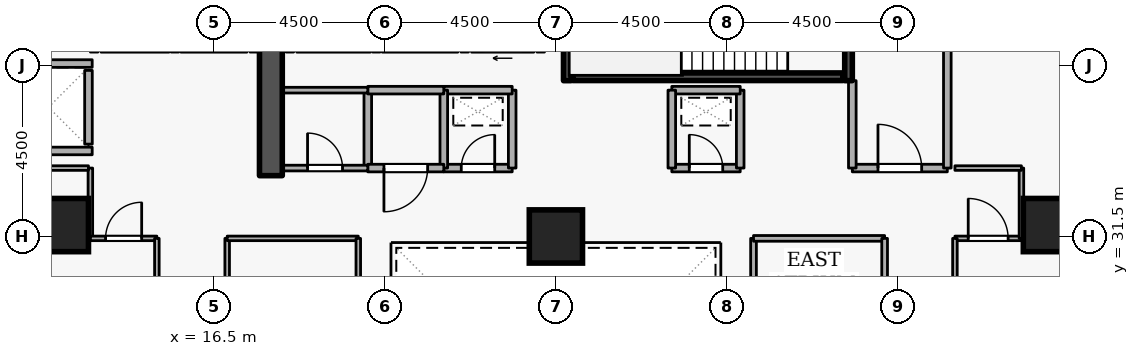
"""IFC4 building model, lengths in metres.
Left out: names, types, materials, properties, quantities, classifications, styles, units other than length and angle.
Written with IfcOpenShell. Run it as: python <this file> out.ifc"""

import sys

from ifc_helpers import new_model, si_unit, direction, frame, frame_2d, origin, origin_2d, place, context, subcontext, project, spatial, rectangle, extrude, element, fill, save


model = new_model("IFC4")
c1 = context("Model", 3, precision=1e-05, world=origin(), true_north=direction((0.0, 1.0)))
c2 = subcontext(c1, "Body", "Model", "MODEL_VIEW")
j1 = project(units=[si_unit("LENGTHUNIT", "METRE"), si_unit("PLANEANGLEUNIT", "RADIAN")], contexts=[c1])
p1 = place(None, origin())
s1 = spatial("IfcSite", under=j1, at=p1, CompositionType="ELEMENT")
p2 = place(p1, origin())
s2 = spatial("IfcBuilding", under=s1, at=p2, CompositionType="ELEMENT")
p3 = place(p2, frame((0.0, 0.0, 68.1)))
s3 = spatial("IfcBuildingStorey", under=s2, at=p3, CompositionType="ELEMENT", Elevation=68.1)
p4 = place(p3, frame((18.0, 33.1, 0.0), z_axis=(0.0, 0.0, 1.0), x_axis=(0.0, 1.0, 0.0)))
e1 = element("IfcWall", 1, at=p4, inside=s3, PredefinedType="SHEAR", context=c2, shape_type="SweptSolid", body=[
    extrude(rectangle(XDim=5.7, YDim=0.6, at=frame_2d((2.85, 0.0))), origin(), (0.0, 0.0, 1.0), 3.6),
])
for number, where, z_axis, x_axis in (
    (2, (12.5, 31.8, 0.0), (0.0, 0.0, 1.0), (1.0, 0.0, 0.0)),
    (3, (38.5, 31.8, 0.0), (0.0, 0.0, 1.0), (1.0, 0.0, 0.0)),
    (4, (25.5, 31.5, 0.0), (0.0, 0.0, 1.0), (1.0, 0.0, 0.0)),
):
    element("IfcColumn", number, at=place(p3, frame(where, z_axis=z_axis, x_axis=x_axis)), inside=s3, PredefinedType="COLUMN", context=c2, shape_type="SweptSolid", body=[
        extrude(rectangle(XDim=1.4, YDim=1.4, at=origin_2d()), origin(), (0.0, 0.0, 1.0), 3.6),
    ])
p5 = place(p3, frame((24.92, 36.45, 0.0), z_axis=(0.0, 0.0, 1.0), x_axis=(-1.0, 0.0, 0.0)))
e5 = element("IfcWall", 5, at=p5, inside=s3, PredefinedType="STANDARD", context=c2, shape_type="SweptSolid", body=[
    extrude(rectangle(XDim=1.64, YDim=0.2, at=frame_2d((0.82, 0.0))), origin(), (0.0, 0.0, 1.0), 3.26),
])
p6 = place(p5, frame((0.31, 0.0, 0.0)))
e6 = element("IfcOpeningElement", 6, at=p6, cuts=e5, PredefinedType="OPENING", context=c2, shape_type="SweptSolid", body=[
    extrude(rectangle(XDim=1.02, YDim=2.06, at=frame_2d((0.51, 1.03))), frame((0.0, 0.11, 0.0), z_axis=(0.0, -1.0, 0.0), x_axis=(1.0, 0.0, 0.0)), (0.0, 0.0, 1.0), 0.22),
])
p7 = place(p3, frame((22.92, 36.45, 0.0), z_axis=(0.0, 0.0, 1.0), x_axis=(-1.0, 0.0, 0.0)))
e7 = element("IfcWall", 7, at=p7, inside=s3, PredefinedType="STANDARD", context=c2, shape_type="SweptSolid", body=[
    extrude(rectangle(XDim=1.99, YDim=0.2, at=frame_2d((0.995, 0.0))), origin(), (0.0, 0.0, 1.0), 3.26),
])
p8 = place(p3, frame((20.62, 36.45, 0.0), z_axis=(0.0, 0.0, 1.0), x_axis=(-1.0, 0.0, 0.0)))
e8 = element("IfcWall", 8, at=p8, inside=s3, PredefinedType="STANDARD", context=c2, shape_type="SweptSolid", body=[
    extrude(rectangle(XDim=1.94, YDim=0.2, at=frame_2d((0.97, 0.0))), origin(), (0.0, 0.0, 1.0), 3.26),
])
p9 = place(p3, frame((17.37, 36.45, 0.0), z_axis=(0.0, 0.0, 1.0), x_axis=(-1.0, 0.0, 0.0)))
e9 = element("IfcWall", 9, at=p9, inside=s3, PredefinedType="STANDARD", context=c2, shape_type="SweptSolid", body=[
    extrude(rectangle(XDim=1.74, YDim=0.2, at=frame_2d((0.87, 0.0))), origin(), (0.0, 0.0, 1.0), 3.26),
])
p10 = place(p3, frame((15.32, 36.45, 0.0), z_axis=(0.0, 0.0, 1.0), x_axis=(-1.0, 0.0, 0.0)))
e10 = element("IfcWall", 10, at=p10, inside=s3, PredefinedType="STANDARD", context=c2, shape_type="SweptSolid", body=[
    extrude(rectangle(XDim=1.79, YDim=0.2, at=frame_2d((0.895, 0.0))), origin(), (0.0, 0.0, 1.0), 3.26),
])
p11 = place(p3, frame((13.2, 33.93, 0.0), z_axis=(0.0, 0.0, 1.0), x_axis=(0.0, 1.0, 0.0)))
e11 = element("IfcWall", 11, at=p11, inside=s3, PredefinedType="STANDARD", context=c2, shape_type="SweptSolid", body=[
    extrude(rectangle(XDim=1.94, YDim=0.2, at=frame_2d((0.97, 0.0))), origin(), (0.0, 0.0, 1.0), 3.26),
])
for number, where, z_axis, x_axis in (
    (12, (11.002, 36.05, 0.0), (0.0, 0.0, 1.0), (1.0, 0.0, 0.0)),
    (13, (11.002, 33.75, 0.0), (0.0, 0.0, 1.0), (1.0, 0.0, 0.0)),
):
    element("IfcWall", number, at=place(p3, frame(where, z_axis=z_axis, x_axis=x_axis)), inside=s3, PredefinedType="STANDARD", context=c2, shape_type="SweptSolid", body=[
        extrude(rectangle(XDim=2.296, YDim=0.2, at=frame_2d((1.148, 0.0))), origin(), (0.0, 0.0, 1.0), 3.26),
    ])
p12 = place(p3, frame((33.2, 38.95, 0.0), z_axis=(0.0, 0.0, 1.0), x_axis=(0.0, -1.0, 0.0)))
e14 = element("IfcWall", 14, at=p12, inside=s3, PredefinedType="SHEAR", context=c2, shape_type="SweptSolid", body=[
    extrude(rectangle(XDim=3.35, YDim=0.2, at=frame_2d((1.675, 0.0))), origin(), (0.0, 0.0, 1.0), 3.6),
])
p13 = place(p12, frame((1.125, 0.0, 0.0)))
e15 = element("IfcOpeningElement", 15, at=p13, cuts=e14, PredefinedType="OPENING", context=c2, shape_type="SweptSolid", body=[
    extrude(rectangle(XDim=1.1, YDim=2.1, at=frame_2d((0.55, 1.05))), frame((0.0, 0.11, 0.0), z_axis=(0.0, -1.0, 0.0), x_axis=(1.0, 0.0, 0.0)), (0.0, 0.0, 1.0), 0.22),
])
p14 = place(p3, frame((25.8, 35.6, 0.0), z_axis=(0.0, 0.0, 1.0), x_axis=(0.0, 1.0, 0.0)))
e16 = element("IfcWall", 16, at=p14, inside=s3, PredefinedType="SHEAR", context=c2, shape_type="SweptSolid", body=[
    extrude(rectangle(XDim=3.35, YDim=0.2, at=frame_2d((1.675, 0.0))), origin(), (0.0, 0.0, 1.0), 3.6),
])
p15 = place(p3, frame((25.95, 35.703, 0.0), z_axis=(0.0, 0.0, 1.0), x_axis=(1.0, 0.0, 0.0)))
e17 = element("IfcWall", 17, at=p15, inside=s3, PredefinedType="SHEAR", context=c2, shape_type="SweptSolid", body=[
    extrude(rectangle(XDim=7.1, YDim=0.2, at=frame_2d((3.55, 0.0))), origin(), (0.0, 0.0, 1.0), 3.6),
])
p16 = place(p3, frame((33.3, 33.3, 0.0), z_axis=(0.0, 0.0, 1.0), x_axis=(1.0, 0.0, 0.0)))
e18 = element("IfcWall", 18, at=p16, inside=s3, PredefinedType="STANDARD", context=c2, shape_type="SweptSolid", body=[
    extrude(rectangle(XDim=2.5, YDim=0.2, at=frame_2d((1.25, 0.0))), origin(), (0.0, 0.0, 1.0), 3.26),
])
p17 = place(p16, frame((0.675, 0.0, 0.0)))
e19 = element("IfcOpeningElement", 19, at=p17, cuts=e18, PredefinedType="OPENING", context=c2, shape_type="SweptSolid", body=[
    extrude(rectangle(XDim=1.15, YDim=2.1, at=frame_2d((0.575, 1.05))), frame((0.0, 0.11, 0.0), z_axis=(0.0, -1.0, 0.0), x_axis=(1.0, 0.0, 0.0)), (0.0, 0.0, 1.0), 0.22),
])
p18 = place(p3, frame((35.8, 33.3, 0.0), z_axis=(0.0, 0.0, 1.0), x_axis=(0.0, 1.0, 0.0)))
e20 = element("IfcWall", 20, at=p18, inside=s3, PredefinedType="STANDARD", context=c2, shape_type="SweptSolid", body=[
    extrude(rectangle(XDim=5.7, YDim=0.2, at=frame_2d((2.85, 0.0))), origin(), (0.0, 0.0, 1.0), 3.26),
])
p19 = place(p3, frame((33.3, 35.6, 0.0), z_axis=(0.0, 0.0, 1.0), x_axis=(0.0, -1.0, 0.0)))
e21 = element("IfcWall", 21, at=p19, inside=s3, PredefinedType="STANDARD", context=c2, shape_type="SweptSolid", body=[
    extrude(rectangle(XDim=2.3, YDim=0.2, at=frame_2d((1.15, 0.0))), origin(), (0.0, 0.0, 1.0), 2.465),
])
p20 = place(p3, frame((22.55, 33.3, 0.0), z_axis=(0.0, 0.0, 1.0), x_axis=(1.0, 0.0, 0.0)))
e22 = element("IfcWall", 22, at=p20, inside=s3, PredefinedType="STANDARD", context=c2, shape_type="SweptSolid", body=[
    extrude(rectangle(XDim=1.8, YDim=0.2, at=frame_2d((0.9, 0.0))), origin(), (0.0, 0.0, 1.0), 3.26),
])
p21 = place(p20, frame((0.46, 0.0, 0.0)))
e23 = element("IfcOpeningElement", 23, at=p21, cuts=e22, PredefinedType="OPENING", context=c2, shape_type="SweptSolid", body=[
    extrude(rectangle(XDim=0.88, YDim=2.04, at=frame_2d((0.44, 1.02))), frame((0.0, 0.11, 0.0), z_axis=(0.0, -1.0, 0.0), x_axis=(1.0, 0.0, 0.0)), (0.0, 0.0, 1.0), 0.22),
])
p22 = place(p3, frame((24.35, 33.3, 0.0), z_axis=(0.0, 0.0, 1.0), x_axis=(0.0, 1.0, 0.0)))
e24 = element("IfcWall", 24, at=p22, inside=s3, PredefinedType="STANDARD", context=c2, shape_type="SweptSolid", body=[
    extrude(rectangle(XDim=2.05, YDim=0.2, at=frame_2d((1.025, 0.0))), origin(), (0.0, 0.0, 1.0), 3.26),
])
p23 = place(p3, frame((24.35, 35.35, 0.0), z_axis=(0.0, 0.0, 1.0), x_axis=(-1.0, 0.0, 0.0)))
e25 = element("IfcWall", 25, at=p23, inside=s3, PredefinedType="STANDARD", context=c2, shape_type="SweptSolid", body=[
    extrude(rectangle(XDim=1.8, YDim=0.2, at=frame_2d((0.9, 0.0))), origin(), (0.0, 0.0, 1.0), 3.26),
])
p24 = place(p3, frame((22.55, 35.35, 0.0), z_axis=(0.0, 0.0, 1.0), x_axis=(0.0, -1.0, 0.0)))
e26 = element("IfcWall", 26, at=p24, inside=s3, PredefinedType="STANDARD", context=c2, shape_type="SweptSolid", body=[
    extrude(rectangle(XDim=2.05, YDim=0.2, at=frame_2d((1.025, 0.0))), origin(), (0.0, 0.0, 1.0), 3.26),
])
p25 = place(p3, frame((28.55, 33.3, 0.0), z_axis=(0.0, 0.0, 1.0), x_axis=(1.0, 0.0, 0.0)))
e27 = element("IfcWall", 27, at=p25, inside=s3, PredefinedType="STANDARD", context=c2, shape_type="SweptSolid", body=[
    extrude(rectangle(XDim=1.8, YDim=0.2, at=frame_2d((0.9, 0.0))), origin(), (0.0, 0.0, 1.0), 3.26),
])
p26 = place(p25, frame((0.46, 0.0, 0.0)))
e28 = element("IfcOpeningElement", 28, at=p26, cuts=e27, PredefinedType="OPENING", context=c2, shape_type="SweptSolid", body=[
    extrude(rectangle(XDim=0.88, YDim=2.04, at=frame_2d((0.44, 1.02))), frame((0.0, 0.11, 0.0), z_axis=(0.0, -1.0, 0.0), x_axis=(1.0, 0.0, 0.0)), (0.0, 0.0, 1.0), 0.22),
])
p27 = place(p3, frame((30.35, 33.3, 0.0), z_axis=(0.0, 0.0, 1.0), x_axis=(0.0, 1.0, 0.0)))
e29 = element("IfcWall", 29, at=p27, inside=s3, PredefinedType="STANDARD", context=c2, shape_type="SweptSolid", body=[
    extrude(rectangle(XDim=2.05, YDim=0.2, at=frame_2d((1.025, 0.0))), origin(), (0.0, 0.0, 1.0), 3.26),
])
p28 = place(p3, frame((30.35, 35.35, 0.0), z_axis=(0.0, 0.0, 1.0), x_axis=(-1.0, 0.0, 0.0)))
e30 = element("IfcWall", 30, at=p28, inside=s3, PredefinedType="STANDARD", context=c2, shape_type="SweptSolid", body=[
    extrude(rectangle(XDim=1.8, YDim=0.2, at=frame_2d((0.9, 0.0))), origin(), (0.0, 0.0, 1.0), 3.26),
])
for number, where, z_axis, x_axis in (
    (31, (28.55, 35.35, 0.0), (0.0, 0.0, 1.0), (0.0, -1.0, 0.0)),
    (32, (20.55, 33.3, 0.0), (0.0, 0.0, 1.0), (0.0, 1.0, 0.0)),
):
    element("IfcWall", number, at=place(p3, frame(where, z_axis=z_axis, x_axis=x_axis)), inside=s3, PredefinedType="STANDARD", context=c2, shape_type="SweptSolid", body=[
        extrude(rectangle(XDim=2.05, YDim=0.2, at=frame_2d((1.025, 0.0))), origin(), (0.0, 0.0, 1.0), 3.26),
    ])
p29 = place(p3, frame((20.55, 35.35, 0.0), z_axis=(0.0, 0.0, 1.0), x_axis=(1.0, 0.0, 0.0)))
e33 = element("IfcWall", 33, at=p29, inside=s3, PredefinedType="STANDARD", context=c2, shape_type="SweptSolid", body=[
    extrude(rectangle(XDim=2.0, YDim=0.2, at=frame_2d((1.0, 0.0))), origin(), (0.0, 0.0, 1.0), 3.26),
])
p30 = place(p3, frame((22.55, 33.3, 0.0), z_axis=(0.0, 0.0, 1.0), x_axis=(-1.0, 0.0, 0.0)))
e34 = element("IfcWall", 34, at=p30, inside=s3, PredefinedType="STANDARD", context=c2, shape_type="SweptSolid", body=[
    extrude(rectangle(XDim=2.0, YDim=0.2, at=frame_2d((1.0, 0.0))), origin(), (0.0, 0.0, 1.0), 3.26),
])
p31 = place(p30, frame((0.425, 0.0, 0.0)))
e35 = element("IfcOpeningElement", 35, at=p31, cuts=e34, PredefinedType="OPENING", context=c2, shape_type="SweptSolid", body=[
    extrude(rectangle(XDim=1.15, YDim=2.1, at=frame_2d((0.575, 1.05))), frame((0.0, 0.11, 0.0), z_axis=(0.0, -1.0, 0.0), x_axis=(1.0, 0.0, 0.0)), (0.0, 0.0, 1.0), 0.22),
])
p32 = place(p3, frame((18.3, 33.3, 0.0), z_axis=(0.0, 0.0, 1.0), x_axis=(1.0, 0.0, 0.0)))
e36 = element("IfcWall", 36, at=p32, inside=s3, PredefinedType="PARTITIONING", context=c2, shape_type="SweptSolid", body=[
    extrude(rectangle(XDim=2.25, YDim=0.15, at=frame_2d((1.125, 0.0))), origin(), (0.0, 0.0, 1.0), 3.26),
])
p33 = place(p32, frame((0.665, 0.0, 0.0)))
e37 = element("IfcOpeningElement", 37, at=p33, cuts=e36, PredefinedType="OPENING", context=c2, shape_type="SweptSolid", body=[
    extrude(rectangle(XDim=0.92, YDim=2.08, at=frame_2d((0.46, 1.04))), frame((0.0, 0.085, 0.0), z_axis=(0.0, -1.0, 0.0), x_axis=(1.0, 0.0, 0.0)), (0.0, 0.0, 1.0), 0.17),
])
p34 = place(p3, frame((20.55, 35.35, 0.0), z_axis=(0.0, 0.0, 1.0), x_axis=(-1.0, 0.0, 0.0)))
e38 = element("IfcWall", 38, at=p34, inside=s3, PredefinedType="PARTITIONING", context=c2, shape_type="SweptSolid", body=[
    extrude(rectangle(XDim=2.25, YDim=0.15, at=frame_2d((1.125, 0.0))), origin(), (0.0, 0.0, 1.0), 3.26),
])
p35 = place(p3, frame((13.25, 33.3, 0.0), z_axis=(0.0, 0.0, 1.0), x_axis=(0.0, -1.0, 0.0)))
e39 = element("IfcWall", 39, at=p35, inside=s3, PredefinedType="PARTITIONING", context=c2, shape_type="SweptSolid", body=[
    extrude(rectangle(XDim=1.85, YDim=0.12, at=frame_2d((0.925, 0.0))), origin(), (0.0, 0.0, 1.0), 3.26),
])
p36 = place(p3, frame((13.25, 31.45, 0.0), z_axis=(0.0, 0.0, 1.0), x_axis=(1.0, 0.0, 0.0)))
e40 = element("IfcWall", 40, at=p36, inside=s3, PredefinedType="PARTITIONING", context=c2, shape_type="SweptSolid", body=[
    extrude(rectangle(XDim=1.75, YDim=0.12, at=frame_2d((0.875, 0.0))), origin(), (0.0, 0.0, 1.0), 3.26),
])
p37 = place(p36, frame((0.4, 0.0, 0.0)))
e41 = element("IfcOpeningElement", 41, at=p37, cuts=e40, PredefinedType="OPENING", context=c2, shape_type="SweptSolid", body=[
    extrude(rectangle(XDim=0.95, YDim=2.1, at=frame_2d((0.475, 1.05))), frame((0.0, 0.07, 0.0), z_axis=(0.0, -1.0, 0.0), x_axis=(1.0, 0.0, 0.0)), (0.0, 0.0, 1.0), 0.14),
])
p38 = place(p3, frame((15.0, 31.45, 0.0), z_axis=(0.0, 0.0, 1.0), x_axis=(0.0, -1.0, 0.0)))
e42 = element("IfcWall", 42, at=p38, inside=s3, PredefinedType="PARTITIONING", context=c2, shape_type="SweptSolid", body=[
    extrude(rectangle(XDim=1.3, YDim=0.12, at=frame_2d((0.65, 0.0))), origin(), (0.0, 0.0, 1.0), 3.26),
])
p39 = place(p3, frame((10.9, 33.3, 0.0), z_axis=(0.0, 0.0, 1.0), x_axis=(1.0, 0.0, 0.0)))
e43 = element("IfcWall", 43, at=p39, inside=s3, PredefinedType="PARTITIONING", context=c2, shape_type="SweptSolid", body=[
    extrude(rectangle(XDim=2.3, YDim=0.12, at=frame_2d((1.15, 0.0))), origin(), (0.0, 0.0, 1.0), 3.26),
])
p40 = place(p3, frame((36.0, 31.45, 0.0), z_axis=(0.0, 0.0, 1.0), x_axis=(1.0, 0.0, 0.0)))
e44 = element("IfcWall", 44, at=p40, inside=s3, PredefinedType="PARTITIONING", context=c2, shape_type="SweptSolid", body=[
    extrude(rectangle(XDim=1.75, YDim=0.12, at=frame_2d((0.875, 0.0))), origin(), (0.0, 0.0, 1.0), 3.26),
])
p41 = place(p40, frame((0.35, 0.0, 0.0)))
e45 = element("IfcOpeningElement", 45, at=p41, cuts=e44, PredefinedType="OPENING", context=c2, shape_type="SweptSolid", body=[
    extrude(rectangle(XDim=1.05, YDim=2.1, at=frame_2d((0.525, 1.05))), frame((0.0, 0.07, 0.0), z_axis=(0.0, -1.0, 0.0), x_axis=(1.0, 0.0, 0.0)), (0.0, 0.0, 1.0), 0.14),
])
p42 = place(p3, frame((37.75, 31.45, 0.0), z_axis=(0.0, 0.0, 1.0), x_axis=(0.0, 1.0, 0.0)))
e46 = element("IfcWall", 46, at=p42, inside=s3, PredefinedType="PARTITIONING", context=c2, shape_type="SweptSolid", body=[
    extrude(rectangle(XDim=1.85, YDim=0.12, at=frame_2d((0.925, 0.0))), origin(), (0.0, 0.0, 1.0), 3.26),
])
p43 = place(p3, frame((37.75, 33.3, 0.0), z_axis=(0.0, 0.0, 1.0), x_axis=(-1.0, 0.0, 0.0)))
e47 = element("IfcWall", 47, at=p43, inside=s3, PredefinedType="PARTITIONING", context=c2, shape_type="SweptSolid", body=[
    extrude(rectangle(XDim=1.75, YDim=0.12, at=frame_2d((0.875, 0.0))), origin(), (0.0, 0.0, 1.0), 3.26),
])
p44 = place(p3, frame((36.0, 30.15, 0.0), z_axis=(0.0, 0.0, 1.0), x_axis=(0.0, 1.0, 0.0)))
e48 = element("IfcWall", 48, at=p44, inside=s3, PredefinedType="PARTITIONING", context=c2, shape_type="SweptSolid", body=[
    extrude(rectangle(XDim=1.3, YDim=0.12, at=frame_2d((0.65, 0.0))), origin(), (0.0, 0.0, 1.0), 3.26),
])
p45 = place(p3, frame((30.7, 22.55, 0.0), z_axis=(0.0, 0.0, 1.0), x_axis=(0.0, 1.0, 0.0)))
e49 = element("IfcWall", 49, at=p45, inside=s3, PredefinedType="PARTITIONING", context=c2, shape_type="SweptSolid", body=[
    extrude(rectangle(XDim=8.9, YDim=0.15, at=frame_2d((4.45, 0.0))), origin(), (0.0, 0.0, 1.0), 3.26),
])
p46 = place(p3, frame((30.7, 31.45, 0.0), z_axis=(0.0, 0.0, 1.0), x_axis=(1.0, 0.0, 0.0)))
e50 = element("IfcWall", 50, at=p46, inside=s3, PredefinedType="PARTITIONING", context=c2, shape_type="SweptSolid", body=[
    extrude(rectangle(XDim=3.45, YDim=0.15, at=frame_2d((1.725, 0.0))), origin(), (0.0, 0.0, 1.0), 3.26),
])
p47 = place(p3, frame((34.15, 31.45, 0.0), z_axis=(0.0, 0.0, 1.0), x_axis=(0.0, -1.0, 0.0)))
e51 = element("IfcWall", 51, at=p47, inside=s3, PredefinedType="PARTITIONING", context=c2, shape_type="SweptSolid", body=[
    extrude(rectangle(XDim=8.9, YDim=0.15, at=frame_2d((4.45, 0.0))), origin(), (0.0, 0.0, 1.0), 3.26),
])
p48 = place(p47, frame((3.8, 0.0, 0.0)))
e52 = element("IfcOpeningElement", 52, at=p48, cuts=e51, PredefinedType="OPENING", context=c2, shape_type="SweptSolid", body=[
    extrude(rectangle(XDim=1.3, YDim=2.12, at=frame_2d((0.65, 1.06))), frame((0.0, 0.085, 0.0), z_axis=(0.0, -1.0, 0.0), x_axis=(1.0, 0.0, 0.0)), (0.0, 0.0, 1.0), 0.17),
])
p49 = place(p3, frame((16.85, 22.55, 0.0), z_axis=(0.0, 0.0, 1.0), x_axis=(0.0, 1.0, 0.0)))
e53 = element("IfcWall", 53, at=p49, inside=s3, PredefinedType="PARTITIONING", context=c2, shape_type="SweptSolid", body=[
    extrude(rectangle(XDim=8.9, YDim=0.12, at=frame_2d((4.45, 0.0))), origin(), (0.0, 0.0, 1.0), 3.26),
])
p50 = place(p49, frame((3.975, 0.0, 0.0)))
e54 = element("IfcOpeningElement", 54, at=p50, cuts=e53, PredefinedType="OPENING", context=c2, shape_type="SweptSolid", body=[
    extrude(rectangle(XDim=0.95, YDim=2.1, at=frame_2d((0.475, 1.05))), frame((0.0, 0.07, 0.0), z_axis=(0.0, -1.0, 0.0), x_axis=(1.0, 0.0, 0.0)), (0.0, 0.0, 1.0), 0.14),
])
p51 = place(p3, frame((16.85, 31.45, 0.0), z_axis=(0.0, 0.0, 1.0), x_axis=(1.0, 0.0, 0.0)))
e55 = element("IfcWall", 55, at=p51, inside=s3, PredefinedType="PARTITIONING", context=c2, shape_type="SweptSolid", body=[
    extrude(rectangle(XDim=3.45, YDim=0.12, at=frame_2d((1.725, 0.0))), origin(), (0.0, 0.0, 1.0), 3.26),
])
p52 = place(p3, frame((20.3, 31.45, 0.0), z_axis=(0.0, 0.0, 1.0), x_axis=(0.0, -1.0, 0.0)))
e56 = element("IfcWall", 56, at=p52, inside=s3, PredefinedType="PARTITIONING", context=c2, shape_type="SweptSolid", body=[
    extrude(rectangle(XDim=8.9, YDim=0.12, at=frame_2d((4.45, 0.0))), origin(), (0.0, 0.0, 1.0), 3.26),
])
p53 = place(p17, origin())
e57 = element("IfcDoor", 57, at=p53, inside=s3, OperationType="SINGLE_SWING_LEFT", PredefinedType="DOOR", context=c2, shape_type="SweptSolid", body=[
    extrude(rectangle(XDim=1.15, YDim=2.1, at=frame_2d((0.575, 1.05))), frame((0.0, 0.025, 0.0), z_axis=(0.0, -1.0, 0.0), x_axis=(1.0, 0.0, 0.0)), (0.0, 0.0, 1.0), 0.05),
])
fill(e19, e57)
p54 = place(p21, origin())
e58 = element("IfcDoor", 58, at=p54, inside=s3, OperationType="SINGLE_SWING_RIGHT", PredefinedType="DOOR", context=c2, shape_type="SweptSolid", body=[
    extrude(rectangle(XDim=0.88, YDim=2.04, at=frame_2d((0.44, 1.02))), frame((0.0, 0.025, 0.0), z_axis=(0.0, -1.0, 0.0), x_axis=(1.0, 0.0, 0.0)), (0.0, 0.0, 1.0), 0.05),
])
fill(e23, e58)
p55 = place(p26, origin())
e59 = element("IfcDoor", 59, at=p55, inside=s3, OperationType="SINGLE_SWING_LEFT", PredefinedType="DOOR", context=c2, shape_type="SweptSolid", body=[
    extrude(rectangle(XDim=0.88, YDim=2.04, at=frame_2d((0.44, 1.02))), frame((0.0, 0.025, 0.0), z_axis=(0.0, -1.0, 0.0), x_axis=(1.0, 0.0, 0.0)), (0.0, 0.0, 1.0), 0.05),
])
fill(e28, e59)
p56 = place(p33, origin())
e60 = element("IfcDoor", 60, at=p56, inside=s3, OperationType="SINGLE_SWING_LEFT", PredefinedType="DOOR", context=c2, shape_type="SweptSolid", body=[
    extrude(rectangle(XDim=0.92, YDim=2.08, at=frame_2d((0.46, 1.04))), frame((0.0, 0.025, 0.0), z_axis=(0.0, -1.0, 0.0), x_axis=(1.0, 0.0, 0.0)), (0.0, 0.0, 1.0), 0.05),
])
fill(e37, e60)
p57 = place(p31, origin())
e61 = element("IfcDoor", 61, at=p57, inside=s3, OperationType="SINGLE_SWING_RIGHT", PredefinedType="DOOR", context=c2, shape_type="SweptSolid", body=[
    extrude(rectangle(XDim=1.15, YDim=2.1, at=frame_2d((0.575, 1.05))), frame((0.0, 0.025, 0.0), z_axis=(0.0, -1.0, 0.0), x_axis=(1.0, 0.0, 0.0)), (0.0, 0.0, 1.0), 0.05),
])
fill(e35, e61)
p58 = place(p37, origin())
e62 = element("IfcDoor", 62, at=p58, inside=s3, OperationType="SINGLE_SWING_RIGHT", PredefinedType="DOOR", context=c2, shape_type="SweptSolid", body=[
    extrude(rectangle(XDim=0.95, YDim=2.1, at=frame_2d((0.475, 1.05))), frame((0.0, 0.025, 0.0), z_axis=(0.0, -1.0, 0.0), x_axis=(1.0, 0.0, 0.0)), (0.0, 0.0, 1.0), 0.05),
])
fill(e41, e62)
p59 = place(p41, origin())
e63 = element("IfcDoor", 63, at=p59, inside=s3, OperationType="SINGLE_SWING_LEFT", PredefinedType="DOOR", context=c2, shape_type="SweptSolid", body=[
    extrude(rectangle(XDim=1.05, YDim=2.1, at=frame_2d((0.525, 1.05))), frame((0.0, 0.025, 0.0), z_axis=(0.0, -1.0, 0.0), x_axis=(1.0, 0.0, 0.0)), (0.0, 0.0, 1.0), 0.05),
])
fill(e45, e63)
save(model, sys.argv[1])
